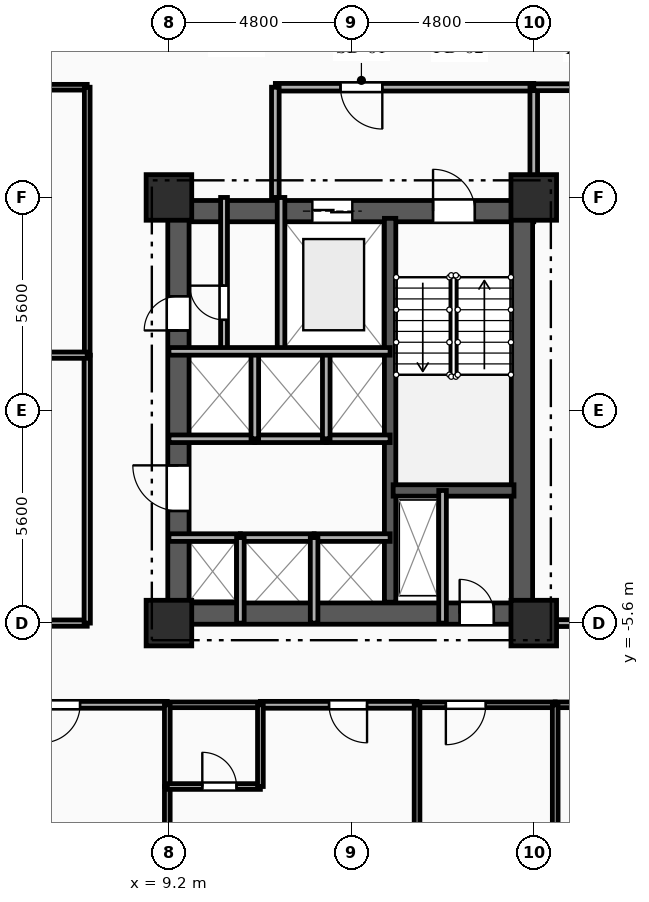
"""IFC4 building model, lengths in metres.
Left out: names, types, materials, properties, quantities, classifications, styles, units other than length and angle.
Written with IfcOpenShell. Run it as: python <this file> out.ifc"""

import sys

from ifc_helpers import new_model, si_unit, direction, frame, frame_2d, origin, origin_2d, place, context, subcontext, project, spatial, rectangle, extrude, element, fill, save


model = new_model("IFC4")
c1 = context("Model", 3, precision=1e-05, world=origin(), true_north=direction((0.0, 1.0)))
c2 = subcontext(c1, "Body", "Model", "MODEL_VIEW")
j1 = project(units=[si_unit("LENGTHUNIT", "METRE"), si_unit("PLANEANGLEUNIT", "RADIAN")], contexts=[c1])
p1 = place(None, origin())
s1 = spatial("IfcSite", under=j1, at=p1, CompositionType="ELEMENT")
p2 = place(p1, origin())
s2 = spatial("IfcBuilding", under=s1, at=p2, CompositionType="ELEMENT")
p3 = place(p2, frame((0.0, 0.0, 53.8)))
s3 = spatial("IfcBuildingStorey", under=s2, at=p3, CompositionType="ELEMENT", Elevation=53.8)
for number, where, z_axis, x_axis in (
    (1, (9.2, -5.6, 0.0), (0.0, 0.0, 1.0), (1.0, 0.0, 0.0)),
    (2, (9.2, 5.6, 0.0), (0.0, 0.0, 1.0), (1.0, 0.0, 0.0)),
    (3, (18.8, -5.6, 0.0), (0.0, 0.0, 1.0), (1.0, 0.0, 0.0)),
    (4, (18.8, 5.6, 0.0), (0.0, 0.0, 1.0), (1.0, 0.0, 0.0)),
):
    element("IfcColumn", number, at=place(p3, frame(where, z_axis=z_axis, x_axis=x_axis)), inside=s3, PredefinedType="COLUMN", context=c2, shape_type="SweptSolid", body=[
        extrude(rectangle(XDim=1.2, YDim=1.2, at=origin_2d()), origin(), (0.0, 0.0, 1.0), 3.35),
    ])
p4 = place(p3, frame((9.2, 5.24, 0.0), z_axis=(0.0, 0.0, 1.0), x_axis=(1.0, 0.0, 0.0)))
e5 = element("IfcWall", 5, at=p4, inside=s3, PredefinedType="SHEAR", context=c2, shape_type="SweptSolid", body=[
    extrude(rectangle(XDim=9.6, YDim=0.56, at=frame_2d((4.8, 0.0))), origin(), (0.0, 0.0, 1.0), 3.035),
])
p5 = place(p4, frame((6.95, 0.0, 0.0)))
e6 = element("IfcOpeningElement", 6, at=p5, cuts=e5, PredefinedType="OPENING", context=c2, shape_type="SweptSolid", body=[
    extrude(rectangle(XDim=1.1, YDim=2.15, at=frame_2d((0.55, 1.075))), frame((0.0, 0.29, 0.0), z_axis=(0.0, -1.0, 0.0), x_axis=(1.0, 0.0, 0.0)), (0.0, 0.0, 1.0), 0.58),
])
p6 = place(p4, frame((3.775, 0.0, 0.0)))
e7 = element("IfcOpeningElement", 7, at=p6, cuts=e5, PredefinedType="OPENING", context=c2, shape_type="SweptSolid", body=[
    extrude(rectangle(XDim=1.05, YDim=2.1, at=frame_2d((0.525, 1.05))), frame((0.0, 0.29, 0.0), z_axis=(0.0, -1.0, 0.0), x_axis=(1.0, 0.0, 0.0)), (0.0, 0.0, 1.0), 0.58),
])
p7 = place(p3, frame((9.2, -5.35, 0.0), z_axis=(0.0, 0.0, 1.0), x_axis=(1.0, 0.0, 0.0)))
e8 = element("IfcWall", 8, at=p7, inside=s3, PredefinedType="SHEAR", context=c2, shape_type="SweptSolid", body=[
    extrude(rectangle(XDim=9.6, YDim=0.56, at=frame_2d((4.8, 0.0))), origin(), (0.0, 0.0, 1.0), 3.035),
])
p8 = place(p7, frame((7.65, 0.0, 0.0)))
e9 = element("IfcOpeningElement", 9, at=p8, cuts=e8, PredefinedType="OPENING", context=c2, shape_type="SweptSolid", body=[
    extrude(rectangle(XDim=0.9, YDim=2.1, at=frame_2d((0.45, 1.05))), frame((0.0, 0.29, 0.0), z_axis=(0.0, -1.0, 0.0), x_axis=(1.0, 0.0, 0.0)), (0.0, 0.0, 1.0), 0.58),
])
p9 = place(p3, frame((9.45, -5.05, 0.0), z_axis=(0.0, 0.0, 1.0), x_axis=(0.0, 1.0, 0.0)))
e10 = element("IfcWall", 10, at=p9, inside=s3, PredefinedType="SHEAR", context=c2, shape_type="SweptSolid", body=[
    extrude(rectangle(XDim=10.1, YDim=0.56, at=frame_2d((5.05, 0.0))), origin(), (0.0, 0.0, 1.0), 3.035),
])
p10 = place(p9, frame((7.15, 0.0, 0.0)))
e11 = element("IfcOpeningElement", 11, at=p10, cuts=e10, PredefinedType="OPENING", context=c2, shape_type="SweptSolid", body=[
    extrude(rectangle(XDim=0.9, YDim=2.1, at=frame_2d((0.45, 1.05))), frame((0.0, 0.29, 0.0), z_axis=(0.0, -1.0, 0.0), x_axis=(1.0, 0.0, 0.0)), (0.0, 0.0, 1.0), 0.58),
])
p11 = place(p9, frame((2.4, 0.0, 0.0)))
e12 = element("IfcOpeningElement", 12, at=p11, cuts=e10, PredefinedType="OPENING", context=c2, shape_type="SweptSolid", body=[
    extrude(rectangle(XDim=1.2, YDim=2.15, at=frame_2d((0.6, 1.075))), frame((0.0, 0.29, 0.0), z_axis=(0.0, -1.0, 0.0), x_axis=(1.0, 0.0, 0.0)), (0.0, 0.0, 1.0), 0.58),
])
p12 = place(p3, frame((18.49, -5.05, 0.0), z_axis=(0.0, 0.0, 1.0), x_axis=(0.0, 1.0, 0.0)))
e13 = element("IfcWall", 13, at=p12, inside=s3, PredefinedType="SHEAR", context=c2, shape_type="SweptSolid", body=[
    extrude(rectangle(XDim=10.1, YDim=0.56, at=frame_2d((5.05, 0.0))), origin(), (0.0, 0.0, 1.0), 3.035),
])
p13 = place(p3, frame((15.02, -5.05, 0.0), z_axis=(0.0, 0.0, 1.0), x_axis=(0.0, 1.0, 0.0)))
e14 = element("IfcWall", 14, at=p13, inside=s3, PredefinedType="SHEAR", context=c2, shape_type="SweptSolid", body=[
    extrude(rectangle(XDim=10.1, YDim=0.3, at=frame_2d((5.05, 0.0))), origin(), (0.0, 0.0, 1.0), 3.035),
])
p14 = place(p3, frame((15.1, -2.11, 0.0), z_axis=(0.0, 0.0, 1.0), x_axis=(1.0, 0.0, 0.0)))
e15 = element("IfcWall", 15, at=p14, inside=s3, PredefinedType="SHEAR", context=c2, shape_type="SweptSolid", body=[
    extrude(rectangle(XDim=3.18, YDim=0.3, at=frame_2d((1.59, 0.0))), origin(), (0.0, 0.0, 1.0), 3.035),
])
p15 = place(p3, frame((16.4, -2.11, 0.0), z_axis=(0.0, 0.0, 1.0), x_axis=(0.0, -1.0, 0.0)))
e16 = element("IfcWall", 16, at=p15, inside=s3, PredefinedType="PARTITIONING", context=c2, shape_type="SweptSolid", body=[
    extrude(rectangle(XDim=3.49, YDim=0.2, at=frame_2d((1.745, 0.0))), origin(), (0.0, 0.0, 1.0), 3.035),
])
p16 = place(p3, frame((12.15, 5.6, 0.0), z_axis=(0.0, 0.0, 1.0), x_axis=(0.0, -1.0, 0.0)))
e17 = element("IfcWall", 17, at=p16, inside=s3, PredefinedType="PARTITIONING", context=c2, shape_type="SweptSolid", body=[
    extrude(rectangle(XDim=4.05, YDim=0.2, at=frame_2d((2.025, 0.0))), origin(), (0.0, 0.0, 1.0), 3.035),
])
p17 = place(p3, frame((18.8, 8.5, 0.0), z_axis=(0.0, 0.0, 1.0), x_axis=(-1.0, 0.0, 0.0)))
e18 = element("IfcWall", 18, at=p17, inside=s3, PredefinedType="PARTITIONING", context=c2, shape_type="SweptSolid", body=[
    extrude(rectangle(XDim=6.8, YDim=0.2, at=frame_2d((3.4, 0.0))), origin(), (0.0, 0.0, 1.0), 3.035),
])
p18 = place(p17, frame((3.985, 0.0, 0.0)))
e19 = element("IfcOpeningElement", 19, at=p18, cuts=e18, PredefinedType="OPENING", context=c2, shape_type="SweptSolid", body=[
    extrude(rectangle(XDim=1.1, YDim=2.15, at=frame_2d((0.55, 1.075))), frame((0.0, 0.11, 0.0), z_axis=(0.0, -1.0, 0.0), x_axis=(1.0, 0.0, 0.0)), (0.0, 0.0, 1.0), 0.22),
])
p19 = place(p3, frame((12.0, 8.5, 0.0), z_axis=(0.0, 0.0, 1.0), x_axis=(0.0, -1.0, 0.0)))
e20 = element("IfcWall", 20, at=p19, inside=s3, PredefinedType="PARTITIONING", context=c2, shape_type="SweptSolid", body=[
    extrude(rectangle(XDim=2.9, YDim=0.2, at=frame_2d((1.45, 0.0))), origin(), (0.0, 0.0, 1.0), 3.035),
])
p20 = place(p3, frame((18.8, 5.6, 0.0), z_axis=(0.0, 0.0, 1.0), x_axis=(0.0, 1.0, 0.0)))
e21 = element("IfcWall", 21, at=p20, inside=s3, PredefinedType="PARTITIONING", context=c2, shape_type="SweptSolid", body=[
    extrude(rectangle(XDim=2.9, YDim=0.2, at=frame_2d((1.45, 0.0))), origin(), (0.0, 0.0, 1.0), 2.52),
])
p21 = place(p3, frame((10.65, 1.55, 0.0), z_axis=(0.0, 0.0, 1.0), x_axis=(0.0, 1.0, 0.0)))
e22 = element("IfcWall", 22, at=p21, inside=s3, PredefinedType="PARTITIONING", context=c2, shape_type="SweptSolid", body=[
    extrude(rectangle(XDim=4.05, YDim=0.18, at=frame_2d((2.025, 0.0))), origin(), (0.0, 0.0, 1.0), 3.035),
])
p22 = place(p21, frame((0.829, 0.0, 0.0)))
e23 = element("IfcOpeningElement", 23, at=p22, cuts=e22, PredefinedType="OPENING", context=c2, shape_type="SweptSolid", body=[
    extrude(rectangle(XDim=0.9, YDim=2.1, at=frame_2d((0.45, 1.05))), frame((0.0, 0.1, 0.0), z_axis=(0.0, -1.0, 0.0), x_axis=(1.0, 0.0, 0.0)), (0.0, 0.0, 1.0), 0.2),
])
p23 = place(p3, frame((9.2, -3.35, 0.0), z_axis=(0.0, 0.0, 1.0), x_axis=(1.0, 0.0, 0.0)))
e24 = element("IfcWall", 24, at=p23, inside=s3, PredefinedType="PARTITIONING", context=c2, shape_type="SweptSolid", body=[
    extrude(rectangle(XDim=1.88, YDim=0.2, at=frame_2d((0.94, 0.0))), origin(), (0.0, 0.0, 1.0), 2.75),
])
p24 = place(p3, frame((11.08, -3.35, 0.0), z_axis=(0.0, 0.0, 1.0), x_axis=(1.0, 0.0, 0.0)))
e25 = element("IfcWall", 25, at=p24, inside=s3, PredefinedType="PARTITIONING", context=c2, shape_type="SweptSolid", body=[
    extrude(rectangle(XDim=1.94, YDim=0.2, at=frame_2d((0.97, 0.0))), origin(), (0.0, 0.0, 1.0), 3.035),
])
p25 = place(p3, frame((13.02, -3.35, 0.0), z_axis=(0.0, 0.0, 1.0), x_axis=(1.0, 0.0, 0.0)))
e26 = element("IfcWall", 26, at=p25, inside=s3, PredefinedType="PARTITIONING", context=c2, shape_type="SweptSolid", body=[
    extrude(rectangle(XDim=2.0, YDim=0.2, at=frame_2d((1.0, 0.0))), origin(), (0.0, 0.0, 1.0), 3.035),
])
p26 = place(p3, frame((11.46, -0.75, 0.0), z_axis=(0.0, 0.0, 1.0), x_axis=(-1.0, 0.0, 0.0)))
e27 = element("IfcWall", 27, at=p26, inside=s3, PredefinedType="PARTITIONING", context=c2, shape_type="SweptSolid", body=[
    extrude(rectangle(XDim=2.26, YDim=0.2, at=frame_2d((1.13, 0.0))), origin(), (0.0, 0.0, 1.0), 3.035),
])
p27 = place(p3, frame((13.34, -0.75, 0.0), z_axis=(0.0, 0.0, 1.0), x_axis=(-1.0, 0.0, 0.0)))
e28 = element("IfcWall", 28, at=p27, inside=s3, PredefinedType="PARTITIONING", context=c2, shape_type="SweptSolid", body=[
    extrude(rectangle(XDim=1.88, YDim=0.2, at=frame_2d((0.94, 0.0))), origin(), (0.0, 0.0, 1.0), 3.035),
])
p28 = place(p3, frame((15.02, -0.75, 0.0), z_axis=(0.0, 0.0, 1.0), x_axis=(-1.0, 0.0, 0.0)))
e29 = element("IfcWall", 29, at=p28, inside=s3, PredefinedType="PARTITIONING", context=c2, shape_type="SweptSolid", body=[
    extrude(rectangle(XDim=1.68, YDim=0.2, at=frame_2d((0.84, 0.0))), origin(), (0.0, 0.0, 1.0), 3.035),
])
for number, where, z_axis, x_axis in (
    (30, (11.08, -5.6, 0.0), (0.0, 0.0, 1.0), (0.0, 1.0, 0.0)),
    (31, (13.02, -5.6, 0.0), (0.0, 0.0, 1.0), (0.0, 1.0, 0.0)),
):
    element("IfcWall", number, at=place(p3, frame(where, z_axis=z_axis, x_axis=x_axis)), inside=s3, PredefinedType="PARTITIONING", context=c2, shape_type="SweptSolid", body=[
        extrude(rectangle(XDim=2.25, YDim=0.2, at=frame_2d((1.125, 0.0))), origin(), (0.0, 0.0, 1.0), 3.035),
    ])
for number, where, z_axis, x_axis in (
    (32, (11.46, -0.75, 0.0), (0.0, 0.0, 1.0), (0.0, 1.0, 0.0)),
    (33, (13.34, -0.75, 0.0), (0.0, 0.0, 1.0), (0.0, 1.0, 0.0)),
):
    element("IfcWall", number, at=place(p3, frame(where, z_axis=z_axis, x_axis=x_axis)), inside=s3, PredefinedType="PARTITIONING", context=c2, shape_type="SweptSolid", body=[
        extrude(rectangle(XDim=2.3, YDim=0.2, at=frame_2d((1.15, 0.0))), origin(), (0.0, 0.0, 1.0), 3.035),
    ])
p29 = place(p3, frame((21.45, 8.5, 0.0), z_axis=(0.0, 0.0, 1.0), x_axis=(-1.0, 0.0, 0.0)))
e34 = element("IfcWall", 34, at=p29, inside=s3, PredefinedType="PARTITIONING", context=c2, shape_type="SweptSolid", body=[
    extrude(rectangle(XDim=2.65, YDim=0.18, at=frame_2d((1.325, 0.0))), origin(), (0.0, 0.0, 1.0), 3.035),
])
p30 = place(p29, frame((0.641, 0.0, 0.0)))
e35 = element("IfcOpeningElement", 35, at=p30, cuts=e34, PredefinedType="OPENING", context=c2, shape_type="SweptSolid", body=[
    extrude(rectangle(XDim=1.0, YDim=2.15, at=frame_2d((0.5, 1.075))), frame((0.0, 0.1, 0.0), z_axis=(0.0, -1.0, 0.0), x_axis=(1.0, 0.0, 0.0)), (0.0, 0.0, 1.0), 0.2),
])
p31 = place(p3, frame((7.05, 8.5, 0.0), z_axis=(0.0, 0.0, 1.0), x_axis=(-1.0, 0.0, 0.0)))
e36 = element("IfcWall", 36, at=p31, inside=s3, PredefinedType="PARTITIONING", context=c2, shape_type="SweptSolid", body=[
    extrude(rectangle(XDim=7.05, YDim=0.15, at=frame_2d((3.525, 0.0))), origin(), (0.0, 0.0, 1.0), 3.035),
])
p32 = place(p3, frame((18.8, -5.6, 0.0), z_axis=(0.0, 0.0, 1.0), x_axis=(1.0, 0.0, 0.0)))
e37 = element("IfcWall", 37, at=p32, inside=s3, PredefinedType="PARTITIONING", context=c2, shape_type="SweptSolid", body=[
    extrude(rectangle(XDim=2.65, YDim=0.18, at=frame_2d((1.325, 0.0))), origin(), (0.0, 0.0, 1.0), 3.035),
])
p33 = place(p3, frame((9.157, -7.75, 0.0), z_axis=(0.0, 0.0, 1.0), x_axis=(-1.0, 0.0, 0.0)))
e38 = element("IfcWall", 38, at=p33, inside=s3, PredefinedType="PARTITIONING", context=c2, shape_type="SweptSolid", body=[
    extrude(rectangle(XDim=4.121, YDim=0.18, at=frame_2d((2.061, 0.0))), origin(), (0.0, 0.0, 1.0), 3.035),
])
p34 = place(p33, frame((2.296, 0.0, 0.0)))
e39 = element("IfcOpeningElement", 39, at=p34, cuts=e38, PredefinedType="OPENING", context=c2, shape_type="SweptSolid", body=[
    extrude(rectangle(XDim=1.0, YDim=2.15, at=frame_2d((0.5, 1.075))), frame((0.0, 0.1, 0.0), z_axis=(0.0, -1.0, 0.0), x_axis=(1.0, 0.0, 0.0)), (0.0, 0.0, 1.0), 0.2),
])
p35 = place(p3, frame((15.729, -7.75, 0.0), z_axis=(0.0, 0.0, 1.0), x_axis=(-1.0, 0.0, 0.0)))
e40 = element("IfcWall", 40, at=p35, inside=s3, PredefinedType="PARTITIONING", context=c2, shape_type="SweptSolid", body=[
    extrude(rectangle(XDim=4.122, YDim=0.18, at=frame_2d((2.061, 0.0))), origin(), (0.0, 0.0, 1.0), 3.035),
])
p36 = place(p35, frame((1.316, 0.0, 0.0)))
e41 = element("IfcOpeningElement", 41, at=p36, cuts=e40, PredefinedType="OPENING", context=c2, shape_type="SweptSolid", body=[
    extrude(rectangle(XDim=1.0, YDim=2.15, at=frame_2d((0.5, 1.075))), frame((0.0, 0.1, 0.0), z_axis=(0.0, -1.0, 0.0), x_axis=(1.0, 0.0, 0.0)), (0.0, 0.0, 1.0), 0.2),
])
p37 = place(p3, frame((11.607, -7.75, 0.0), z_axis=(0.0, 0.0, 1.0), x_axis=(-1.0, 0.0, 0.0)))
e42 = element("IfcWall", 42, at=p37, inside=s3, PredefinedType="PLUMBINGWALL", context=c2, shape_type="SweptSolid", body=[
    extrude(rectangle(XDim=2.45, YDim=0.15, at=frame_2d((1.225, 0.0))), origin(), (0.0, 0.0, 1.0), 3.035),
])
p38 = place(p3, frame((19.365, -7.75, 0.0), z_axis=(0.0, 0.0, 1.0), x_axis=(-1.0, 0.0, 0.0)))
e43 = element("IfcWall", 43, at=p38, inside=s3, PredefinedType="PARTITIONING", context=c2, shape_type="SweptSolid", body=[
    extrude(rectangle(XDim=3.635, YDim=0.15, at=frame_2d((1.818, 0.0))), origin(), (0.0, 0.0, 1.0), 3.035),
])
p39 = place(p38, frame((1.827, 0.0, 0.0)))
e44 = element("IfcOpeningElement", 44, at=p39, cuts=e43, PredefinedType="OPENING", context=c2, shape_type="SweptSolid", body=[
    extrude(rectangle(XDim=1.05, YDim=2.15, at=frame_2d((0.525, 1.075))), frame((0.0, 0.085, 0.0), z_axis=(0.0, -1.0, 0.0), x_axis=(1.0, 0.0, 0.0)), (0.0, 0.0, 1.0), 0.17),
])
p40 = place(p3, frame((23.0, -7.75, 0.0), z_axis=(0.0, 0.0, 1.0), x_axis=(-1.0, 0.0, 0.0)))
e45 = element("IfcWall", 45, at=p40, inside=s3, PredefinedType="PARTITIONING", context=c2, shape_type="SweptSolid", body=[
    extrude(rectangle(XDim=3.635, YDim=0.15, at=frame_2d((1.818, 0.0))), origin(), (0.0, 0.0, 1.0), 3.035),
])
p41 = place(p40, frame((0.758, 0.0, 0.0)))
e46 = element("IfcOpeningElement", 46, at=p41, cuts=e45, PredefinedType="OPENING", context=c2, shape_type="SweptSolid", body=[
    extrude(rectangle(XDim=1.05, YDim=2.15, at=frame_2d((0.525, 1.075))), frame((0.0, 0.085, 0.0), z_axis=(0.0, -1.0, 0.0), x_axis=(1.0, 0.0, 0.0)), (0.0, 0.0, 1.0), 0.17),
])
p42 = place(p3, frame((0.0, -5.6, 0.0), z_axis=(0.0, 0.0, 1.0), x_axis=(1.0, 0.0, 0.0)))
e47 = element("IfcWall", 47, at=p42, inside=s3, PredefinedType="PARTITIONING", context=c2, shape_type="SweptSolid", body=[
    extrude(rectangle(XDim=7.05, YDim=0.165, at=frame_2d((3.525, 0.0))), origin(), (0.0, 0.0, 1.0), 2.52),
])
p43 = place(p3, frame((7.05, -5.6, 0.0), z_axis=(0.0, 0.0, 1.0), x_axis=(0.0, 1.0, 0.0)))
e48 = element("IfcWall", 48, at=p43, inside=s3, PredefinedType="PARTITIONING", context=c2, shape_type="SweptSolid", body=[
    extrude(rectangle(XDim=7.05, YDim=0.165, at=frame_2d((3.525, 0.0))), origin(), (0.0, 0.0, 1.0), 3.035),
])
p44 = place(p3, frame((7.05, 1.45, 0.0), z_axis=(0.0, 0.0, 1.0), x_axis=(0.0, 1.0, 0.0)))
e49 = element("IfcWall", 49, at=p44, inside=s3, PredefinedType="PARTITIONING", context=c2, shape_type="SweptSolid", body=[
    extrude(rectangle(XDim=7.05, YDim=0.15, at=frame_2d((3.525, 0.0))), origin(), (0.0, 0.0, 1.0), 3.035),
])
p45 = place(p3, frame((9.157, -9.9, 0.0), z_axis=(0.0, 0.0, 1.0), x_axis=(0.0, -1.0, 0.0)))
e50 = element("IfcWall", 50, at=p45, inside=s3, PredefinedType="PARTITIONING", context=c2, shape_type="SweptSolid", body=[
    extrude(rectangle(XDim=9.5, YDim=0.15, at=frame_2d((4.75, 0.0))), origin(), (0.0, 0.0, 1.0), 2.52),
])
p46 = place(p3, frame((9.157, -7.75, 0.0), z_axis=(0.0, 0.0, 1.0), x_axis=(0.0, -1.0, 0.0)))
e51 = element("IfcWall", 51, at=p46, inside=s3, PredefinedType="PLUMBINGWALL", context=c2, shape_type="SweptSolid", body=[
    extrude(rectangle(XDim=2.15, YDim=0.15, at=frame_2d((1.075, 0.0))), origin(), (0.0, 0.0, 1.0), 2.52),
])
p47 = place(p3, frame((9.157, -9.9, 0.0), z_axis=(0.0, 0.0, 1.0), x_axis=(1.0, 0.0, 0.0)))
e52 = element("IfcWall", 52, at=p47, inside=s3, PredefinedType="PLUMBINGWALL", context=c2, shape_type="SweptSolid", body=[
    extrude(rectangle(XDim=2.45, YDim=0.15, at=frame_2d((1.225, 0.0))), origin(), (0.0, 0.0, 1.0), 3.035),
])
p48 = place(p47, frame((0.921, 0.0, 0.0)))
e53 = element("IfcOpeningElement", 53, at=p48, cuts=e52, PredefinedType="OPENING", context=c2, shape_type="SweptSolid", body=[
    extrude(rectangle(XDim=0.9, YDim=2.1, at=frame_2d((0.45, 1.05))), frame((0.0, 0.085, 0.0), z_axis=(0.0, -1.0, 0.0), x_axis=(1.0, 0.0, 0.0)), (0.0, 0.0, 1.0), 0.17),
])
p49 = place(p3, frame((11.607, -9.9, 0.0), z_axis=(0.0, 0.0, 1.0), x_axis=(0.0, 1.0, 0.0)))
e54 = element("IfcWall", 54, at=p49, inside=s3, PredefinedType="PLUMBINGWALL", context=c2, shape_type="SweptSolid", body=[
    extrude(rectangle(XDim=2.15, YDim=0.15, at=frame_2d((1.075, 0.0))), origin(), (0.0, 0.0, 1.0), 3.035),
])
for number, where, z_axis, x_axis in (
    (55, (15.729, -7.75, 0.0), (0.0, 0.0, 1.0), (0.0, -1.0, 0.0)),
    (56, (19.365, -7.75, 0.0), (0.0, 0.0, 1.0), (0.0, -1.0, 0.0)),
):
    element("IfcWall", number, at=place(p3, frame(where, z_axis=z_axis, x_axis=x_axis)), inside=s3, PredefinedType="PARTITIONING", context=c2, shape_type="SweptSolid", body=[
        extrude(rectangle(XDim=11.65, YDim=0.15, at=frame_2d((5.825, 0.0))), origin(), (0.0, 0.0, 1.0), 3.035),
    ])
p50 = place(p3, frame((-7.05, 1.45, 0.0), z_axis=(0.0, 0.0, 1.0), x_axis=(1.0, 0.0, 0.0)))
e57 = element("IfcWall", 57, at=p50, inside=s3, PredefinedType="PARTITIONING", context=c2, shape_type="SweptSolid", body=[
    extrude(rectangle(XDim=14.1, YDim=0.165, at=frame_2d((7.05, 0.0))), origin(), (0.0, 0.0, 1.0), 3.035),
])
p51 = place(p3, frame((9.2, 1.55, 0.0), z_axis=(0.0, 0.0, 1.0), x_axis=(1.0, 0.0, 0.0)))
e58 = element("IfcWall", 58, at=p51, inside=s3, PredefinedType="PARTITIONING", context=c2, shape_type="SweptSolid", body=[
    extrude(rectangle(XDim=5.82, YDim=0.2, at=frame_2d((2.91, 0.0))), origin(), (0.0, 0.0, 1.0), 3.035),
])
p52 = place(p5, origin())
e59 = element("IfcDoor", 59, at=p52, inside=s3, OperationType="SINGLE_SWING_LEFT", PredefinedType="DOOR", context=c2, shape_type="SweptSolid", body=[
    extrude(rectangle(XDim=1.1, YDim=2.15, at=frame_2d((0.55, 1.075))), frame((0.0, 0.025, 0.0), z_axis=(0.0, -1.0, 0.0), x_axis=(1.0, 0.0, 0.0)), (0.0, 0.0, 1.0), 0.05),
])
fill(e6, e59)
p53 = place(p6, origin())
e60 = element("IfcDoor", 60, at=p53, inside=s3, OperationType="DOUBLE_DOOR_SLIDING", PredefinedType="DOOR", context=c2, shape_type="SweptSolid", body=[
    extrude(rectangle(XDim=1.05, YDim=2.1, at=frame_2d((0.525, 1.05))), frame((0.0, 0.025, 0.0), z_axis=(0.0, -1.0, 0.0), x_axis=(1.0, 0.0, 0.0)), (0.0, 0.0, 1.0), 0.05),
])
fill(e7, e60)
p54 = place(p8, origin())
e61 = element("IfcDoor", 61, at=p54, inside=s3, OperationType="SINGLE_SWING_LEFT", PredefinedType="DOOR", context=c2, shape_type="SweptSolid", body=[
    extrude(rectangle(XDim=0.9, YDim=2.1, at=frame_2d((0.45, 1.05))), frame((0.0, 0.025, 0.0), z_axis=(0.0, -1.0, 0.0), x_axis=(1.0, 0.0, 0.0)), (0.0, 0.0, 1.0), 0.05),
])
fill(e9, e61)
p55 = place(p18, origin())
e62 = element("IfcDoor", 62, at=p55, inside=s3, OperationType="SINGLE_SWING_LEFT", PredefinedType="DOOR", context=c2, shape_type="SweptSolid", body=[
    extrude(rectangle(XDim=1.1, YDim=2.15, at=frame_2d((0.55, 1.075))), frame((0.0, 0.025, 0.0), z_axis=(0.0, -1.0, 0.0), x_axis=(1.0, 0.0, 0.0)), (0.0, 0.0, 1.0), 0.05),
])
fill(e19, e62)
p56 = place(p22, origin())
e63 = element("IfcDoor", 63, at=p56, inside=s3, OperationType="SINGLE_SWING_RIGHT", PredefinedType="DOOR", context=c2, shape_type="SweptSolid", body=[
    extrude(rectangle(XDim=0.9, YDim=2.1, at=frame_2d((0.45, 1.05))), frame((0.0, 0.025, 0.0), z_axis=(0.0, -1.0, 0.0), x_axis=(1.0, 0.0, 0.0)), (0.0, 0.0, 1.0), 0.05),
])
fill(e23, e63)
p57 = place(p10, origin())
e64 = element("IfcDoor", 64, at=p57, inside=s3, OperationType="SINGLE_SWING_LEFT", PredefinedType="DOOR", context=c2, shape_type="SweptSolid", body=[
    extrude(rectangle(XDim=0.9, YDim=2.1, at=frame_2d((0.45, 1.05))), frame((0.0, 0.025, 0.0), z_axis=(0.0, -1.0, 0.0), x_axis=(1.0, 0.0, 0.0)), (0.0, 0.0, 1.0), 0.05),
])
fill(e11, e64)
p58 = place(p11, origin())
e65 = element("IfcDoor", 65, at=p58, inside=s3, OperationType="SINGLE_SWING_RIGHT", PredefinedType="DOOR", context=c2, shape_type="SweptSolid", body=[
    extrude(rectangle(XDim=1.2, YDim=2.15, at=frame_2d((0.6, 1.075))), frame((0.0, 0.025, 0.0), z_axis=(0.0, -1.0, 0.0), x_axis=(1.0, 0.0, 0.0)), (0.0, 0.0, 1.0), 0.05),
])
fill(e12, e65)
p59 = place(p34, origin())
e66 = element("IfcDoor", 66, at=p59, inside=s3, OperationType="SINGLE_SWING_RIGHT", PredefinedType="DOOR", context=c2, shape_type="SweptSolid", body=[
    extrude(rectangle(XDim=1.0, YDim=2.15, at=frame_2d((0.5, 1.075))), frame((0.0, 0.025, 0.0), z_axis=(0.0, -1.0, 0.0), x_axis=(1.0, 0.0, 0.0)), (0.0, 0.0, 1.0), 0.05),
])
fill(e39, e66)
p60 = place(p36, origin())
e67 = element("IfcDoor", 67, at=p60, inside=s3, OperationType="SINGLE_SWING_LEFT", PredefinedType="DOOR", context=c2, shape_type="SweptSolid", body=[
    extrude(rectangle(XDim=1.0, YDim=2.15, at=frame_2d((0.5, 1.075))), frame((0.0, 0.025, 0.0), z_axis=(0.0, -1.0, 0.0), x_axis=(1.0, 0.0, 0.0)), (0.0, 0.0, 1.0), 0.05),
])
fill(e41, e67)
p61 = place(p39, origin())
e68 = element("IfcDoor", 68, at=p61, inside=s3, OperationType="SINGLE_SWING_RIGHT", PredefinedType="DOOR", context=c2, shape_type="SweptSolid", body=[
    extrude(rectangle(XDim=1.05, YDim=2.15, at=frame_2d((0.525, 1.075))), frame((0.0, 0.025, 0.0), z_axis=(0.0, -1.0, 0.0), x_axis=(1.0, 0.0, 0.0)), (0.0, 0.0, 1.0), 0.05),
])
fill(e44, e68)
p62 = place(p48, origin())
e69 = element("IfcDoor", 69, at=p62, inside=s3, OperationType="SINGLE_SWING_LEFT", PredefinedType="DOOR", context=c2, shape_type="SweptSolid", body=[
    extrude(rectangle(XDim=0.9, YDim=2.1, at=frame_2d((0.45, 1.05))), frame((0.0, 0.025, 0.0), z_axis=(0.0, -1.0, 0.0), x_axis=(1.0, 0.0, 0.0)), (0.0, 0.0, 1.0), 0.05),
])
fill(e53, e69)
save(model, sys.argv[1])
